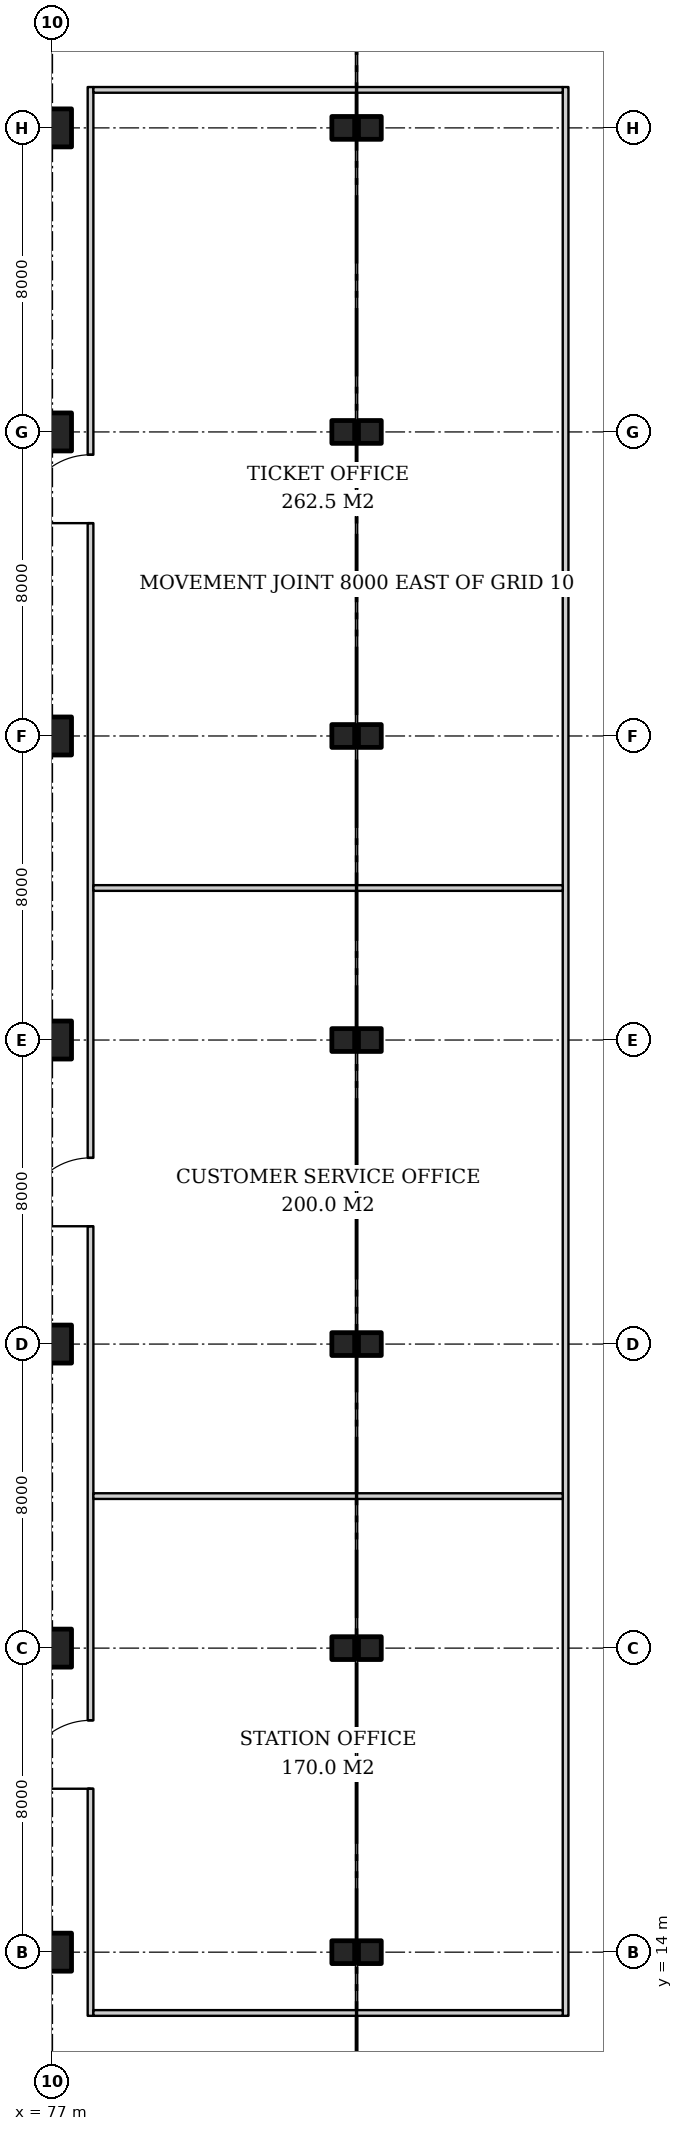
"""IFC4 building model, lengths in metres.
Left out: names, types, materials, properties, quantities, classifications, styles, units other than length and angle.
Written with IfcOpenShell. Run it as: python <this file> out.ifc"""

import sys

from ifc_helpers import new_model, si_unit, direction, frame, frame_2d, origin, origin_2d, place, context, subcontext, project, spatial, rectangle, extrude, element, fill, save


model = new_model("IFC4")
c1 = context("Model", 3, precision=1e-05, world=origin(), true_north=direction((0.0, 1.0)))
c2 = subcontext(c1, "Body", "Model", "MODEL_VIEW")
j1 = project(units=[si_unit("LENGTHUNIT", "METRE"), si_unit("PLANEANGLEUNIT", "RADIAN")], contexts=[c1])
p1 = place(None, origin())
s1 = spatial("IfcSite", under=j1, at=p1, CompositionType="ELEMENT")
p2 = place(p1, origin())
s2 = spatial("IfcBuilding", under=s1, at=p2, CompositionType="ELEMENT")
p3 = place(p2, frame((0.0, 0.0, -5.0)))
s3 = spatial("IfcBuildingStorey", under=s2, at=p3, CompositionType="ELEMENT", Elevation=-5.0)
for number, where, z_axis, x_axis in (
    (1, (77.0, 14.0, 0.0), (0.0, 0.0, 1.0), (1.0, 0.0, 0.0)),
    (2, (77.0, 22.0, 0.0), (0.0, 0.0, 1.0), (1.0, 0.0, 0.0)),
    (3, (77.0, 30.0, 0.0), (0.0, 0.0, 1.0), (1.0, 0.0, 0.0)),
    (4, (77.0, 38.0, 0.0), (0.0, 0.0, 1.0), (1.0, 0.0, 0.0)),
    (5, (77.0, 46.0, 0.0), (0.0, 0.0, 1.0), (1.0, 0.0, 0.0)),
    (6, (77.0, 54.0, 0.0), (0.0, 0.0, 1.0), (1.0, 0.0, 0.0)),
    (7, (77.0, 62.0, 0.0), (0.0, 0.0, 1.0), (1.0, 0.0, 0.0)),
):
    element("IfcColumn", number, at=place(p3, frame(where, z_axis=z_axis, x_axis=x_axis)), inside=s3, PredefinedType="COLUMN", context=c2, shape_type="SweptSolid", body=[
        extrude(rectangle(XDim=1.0, YDim=1.0, at=origin_2d()), origin(), (0.0, 0.0, 1.0), 5.0),
    ])
for number, where, z_axis, x_axis in (
    (8, (84.65, 14.0, 0.0), (0.0, 0.0, 1.0), (1.0, 0.0, 0.0)),
    (9, (85.35, 14.0, 0.0), (0.0, 0.0, 1.0), (1.0, 0.0, 0.0)),
    (10, (84.65, 22.0, 0.0), (0.0, 0.0, 1.0), (1.0, 0.0, 0.0)),
    (11, (85.35, 22.0, 0.0), (0.0, 0.0, 1.0), (1.0, 0.0, 0.0)),
    (12, (84.65, 30.0, 0.0), (0.0, 0.0, 1.0), (1.0, 0.0, 0.0)),
    (13, (85.35, 30.0, 0.0), (0.0, 0.0, 1.0), (1.0, 0.0, 0.0)),
    (14, (84.65, 38.0, 0.0), (0.0, 0.0, 1.0), (1.0, 0.0, 0.0)),
    (15, (85.35, 38.0, 0.0), (0.0, 0.0, 1.0), (1.0, 0.0, 0.0)),
    (16, (84.65, 46.0, 0.0), (0.0, 0.0, 1.0), (1.0, 0.0, 0.0)),
    (17, (85.35, 46.0, 0.0), (0.0, 0.0, 1.0), (1.0, 0.0, 0.0)),
    (18, (84.65, 54.0, 0.0), (0.0, 0.0, 1.0), (1.0, 0.0, 0.0)),
    (19, (85.35, 54.0, 0.0), (0.0, 0.0, 1.0), (1.0, 0.0, 0.0)),
    (20, (84.65, 62.0, 0.0), (0.0, 0.0, 1.0), (1.0, 0.0, 0.0)),
    (21, (85.35, 62.0, 0.0), (0.0, 0.0, 1.0), (1.0, 0.0, 0.0)),
):
    element("IfcColumn", number, at=place(p3, frame(where, z_axis=z_axis, x_axis=x_axis)), inside=s3, PredefinedType="COLUMN", context=c2, shape_type="SweptSolid", body=[
        extrude(rectangle(XDim=0.6, YDim=0.6, at=origin_2d()), origin(), (0.0, 0.0, 1.0), 5.0),
    ])
p4 = place(p3, frame((78.0, 12.325, 0.0), z_axis=(0.0, 0.0, 1.0), x_axis=(0.0, 1.0, 0.0)))
e22 = element("IfcWall", 22, at=p4, inside=s3, PredefinedType="PARTITIONING", context=c2, shape_type="SweptSolid", body=[
    extrude(rectangle(XDim=50.75, YDim=0.15, at=frame_2d((25.375, 0.0))), origin(), (0.0, 0.0, 1.0), 4.6),
])
p5 = place(p4, frame((5.975, 0.0, 0.0)))
e23 = element("IfcOpeningElement", 23, at=p5, cuts=e22, PredefinedType="OPENING", context=c2, shape_type="SweptSolid", body=[
    extrude(rectangle(XDim=1.8, YDim=2.4, at=frame_2d((0.9, 1.2))), frame((0.0, 0.085, 0.0), z_axis=(0.0, -1.0, 0.0), x_axis=(1.0, 0.0, 0.0)), (0.0, 0.0, 1.0), 0.17),
])
p6 = place(p4, frame((20.775, 0.0, 0.0)))
e24 = element("IfcOpeningElement", 24, at=p6, cuts=e22, PredefinedType="OPENING", context=c2, shape_type="SweptSolid", body=[
    extrude(rectangle(XDim=1.8, YDim=2.4, at=frame_2d((0.9, 1.2))), frame((0.0, 0.085, 0.0), z_axis=(0.0, -1.0, 0.0), x_axis=(1.0, 0.0, 0.0)), (0.0, 0.0, 1.0), 0.17),
])
p7 = place(p4, frame((39.275, 0.0, 0.0)))
e25 = element("IfcOpeningElement", 25, at=p7, cuts=e22, PredefinedType="OPENING", context=c2, shape_type="SweptSolid", body=[
    extrude(rectangle(XDim=1.8, YDim=2.4, at=frame_2d((0.9, 1.2))), frame((0.0, 0.085, 0.0), z_axis=(0.0, -1.0, 0.0), x_axis=(1.0, 0.0, 0.0)), (0.0, 0.0, 1.0), 0.17),
])
p8 = place(p3, frame((90.5, 12.325, 0.0), z_axis=(0.0, 0.0, 1.0), x_axis=(0.0, 1.0, 0.0)))
e26 = element("IfcWall", 26, at=p8, inside=s3, PredefinedType="PARTITIONING", context=c2, shape_type="SweptSolid", body=[
    extrude(rectangle(XDim=50.75, YDim=0.15, at=frame_2d((25.375, 0.0))), origin(), (0.0, 0.0, 1.0), 4.6),
])
for number, where, z_axis, x_axis in (
    (27, (78.075, 12.4, 0.0), (0.0, 0.0, 1.0), (1.0, 0.0, 0.0)),
    (28, (78.075, 63.0, 0.0), (0.0, 0.0, 1.0), (1.0, 0.0, 0.0)),
    (29, (78.075, 26.0, 0.0), (0.0, 0.0, 1.0), (1.0, 0.0, 0.0)),
    (30, (78.075, 42.0, 0.0), (0.0, 0.0, 1.0), (1.0, 0.0, 0.0)),
):
    element("IfcWall", number, at=place(p3, frame(where, z_axis=z_axis, x_axis=x_axis)), inside=s3, PredefinedType="PARTITIONING", context=c2, shape_type="SweptSolid", body=[
        extrude(rectangle(XDim=12.35, YDim=0.15, at=frame_2d((6.175, 0.0))), origin(), (0.0, 0.0, 1.0), 4.6),
    ])
p9 = place(p5, origin())
e31 = element("IfcDoor", 31, at=p9, inside=s3, OperationType="DOUBLE_DOOR_SINGLE_SWING", PredefinedType="DOOR", context=c2, shape_type="SweptSolid", body=[
    extrude(rectangle(XDim=1.8, YDim=2.4, at=frame_2d((0.9, 1.2))), frame((0.0, 0.025, 0.0), z_axis=(0.0, -1.0, 0.0), x_axis=(1.0, 0.0, 0.0)), (0.0, 0.0, 1.0), 0.05),
])
fill(e23, e31)
p10 = place(p6, origin())
e32 = element("IfcDoor", 32, at=p10, inside=s3, OperationType="DOUBLE_DOOR_SINGLE_SWING", PredefinedType="DOOR", context=c2, shape_type="SweptSolid", body=[
    extrude(rectangle(XDim=1.8, YDim=2.4, at=frame_2d((0.9, 1.2))), frame((0.0, 0.025, 0.0), z_axis=(0.0, -1.0, 0.0), x_axis=(1.0, 0.0, 0.0)), (0.0, 0.0, 1.0), 0.05),
])
fill(e24, e32)
p11 = place(p7, origin())
e33 = element("IfcDoor", 33, at=p11, inside=s3, OperationType="DOUBLE_DOOR_SINGLE_SWING", PredefinedType="DOOR", context=c2, shape_type="SweptSolid", body=[
    extrude(rectangle(XDim=1.8, YDim=2.4, at=frame_2d((0.9, 1.2))), frame((0.0, 0.025, 0.0), z_axis=(0.0, -1.0, 0.0), x_axis=(1.0, 0.0, 0.0)), (0.0, 0.0, 1.0), 0.05),
])
fill(e25, e33)
save(model, sys.argv[1])
